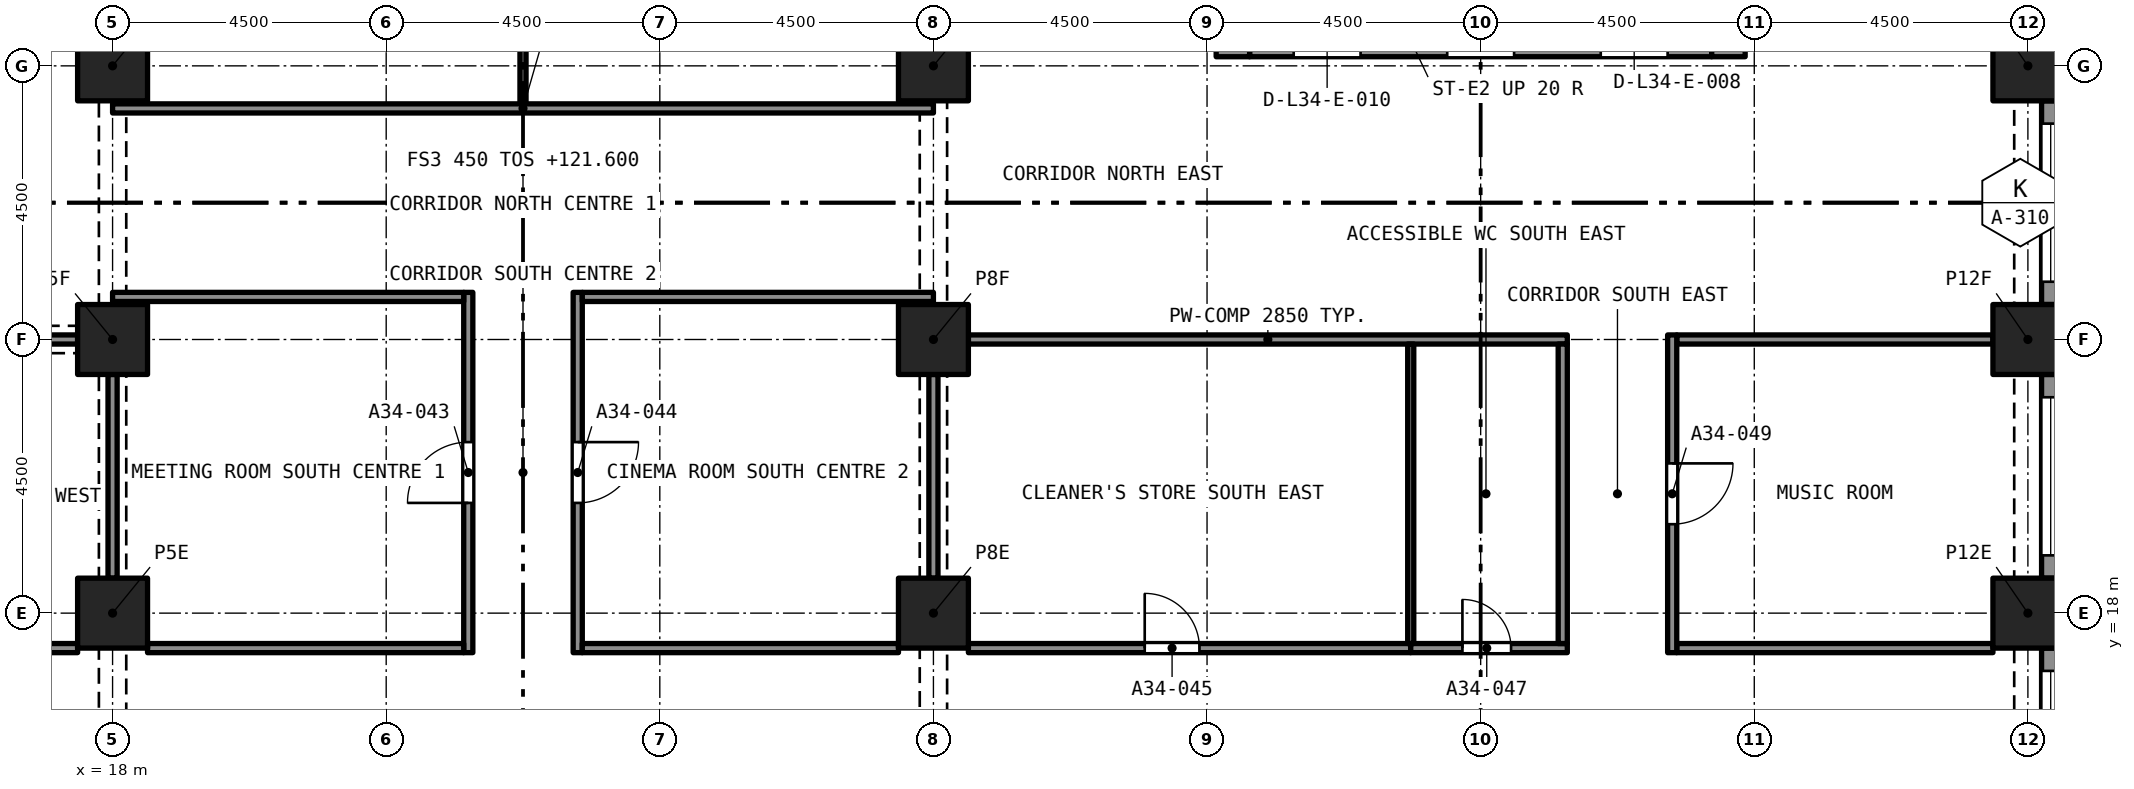
"""IFC4 building model, lengths in metres.
Left out: names, types, materials, properties, quantities, classifications, styles, units other than length and angle.
Written with IfcOpenShell. Run it as: python <this file> out.ifc"""

import sys

from ifc_helpers import new_model, si_unit, direction, frame, frame_2d, origin, origin_2d, place, context, subcontext, project, spatial, rectangle, extrude, element, fill, save


model = new_model("IFC4")
c1 = context("Model", 3, precision=1e-05, world=origin(), true_north=direction((0.0, 1.0)))
c2 = subcontext(c1, "Body", "Model", "MODEL_VIEW")
j1 = project(units=[si_unit("LENGTHUNIT", "METRE"), si_unit("PLANEANGLEUNIT", "RADIAN")], contexts=[c1])
p1 = place(None, origin())
s1 = spatial("IfcSite", under=j1, at=p1, CompositionType="ELEMENT")
p2 = place(p1, origin())
s2 = spatial("IfcBuilding", under=s1, at=p2, CompositionType="ELEMENT")
p3 = place(p2, frame((0.0, 0.0, 121.6)))
s3 = spatial("IfcBuildingStorey", under=s2, at=p3, CompositionType="ELEMENT", Elevation=121.6)
for number, where, z_axis, x_axis in (
    (1, (18.0, 18.0, 0.0), (0.0, 0.0, 1.0), (1.0, 0.0, 0.0)),
    (2, (31.5, 18.0, 0.0), (0.0, 0.0, 1.0), (1.0, 0.0, 0.0)),
    (3, (49.5, 18.0, 0.0), (0.0, 0.0, 1.0), (1.0, 0.0, 0.0)),
    (4, (18.0, 22.5, 0.0), (0.0, 0.0, 1.0), (1.0, 0.0, 0.0)),
    (5, (31.5, 22.5, 0.0), (0.0, 0.0, 1.0), (1.0, 0.0, 0.0)),
    (6, (49.5, 22.5, 0.0), (0.0, 0.0, 1.0), (1.0, 0.0, 0.0)),
    (7, (18.0, 27.0, 0.0), (0.0, 0.0, 1.0), (1.0, 0.0, 0.0)),
    (8, (31.5, 27.0, 0.0), (0.0, 0.0, 1.0), (1.0, 0.0, 0.0)),
    (9, (49.5, 27.0, 0.0), (0.0, 0.0, 1.0), (1.0, 0.0, 0.0)),
):
    element("IfcColumn", number, at=place(p3, frame(where, z_axis=z_axis, x_axis=x_axis)), inside=s3, PredefinedType="COLUMN", context=c2, shape_type="SweptSolid", body=[
        extrude(rectangle(XDim=1.15, YDim=1.15, at=origin_2d()), origin(), (0.0, 0.0, 1.0), 3.2),
    ])
p4 = place(p3, frame((36.7, 27.425, 0.0), z_axis=(0.0, 0.0, 1.0), x_axis=(1.0, 0.0, 0.0)))
e10 = element("IfcWall", 10, at=p4, inside=s3, PredefinedType="SOLIDWALL", context=c2, shape_type="SweptSolid", body=[
    extrude(rectangle(XDim=7.6, YDim=0.55, at=frame_2d((3.8, 0.0))), origin(), (0.0, 0.0, 1.0), 3.2),
])
p5 = place(p4, frame((5.775, 0.0, 0.0)))
e11 = element("IfcOpeningElement", 11, at=p5, cuts=e10, PredefinedType="OPENING", context=c2, shape_type="SweptSolid", body=[
    extrude(rectangle(XDim=1.1, YDim=2.1, at=frame_2d((0.55, 1.05))), frame((0.0, 0.285, 0.0), z_axis=(0.0, -1.0, 0.0), x_axis=(1.0, 0.0, 0.0)), (0.0, 0.0, 1.0), 0.57),
])
p6 = place(p4, frame((3.25, 0.0, 0.0)))
e12 = element("IfcOpeningElement", 12, at=p6, cuts=e10, PredefinedType="OPENING", context=c2, shape_type="SweptSolid", body=[
    extrude(rectangle(XDim=1.1, YDim=2.1, at=frame_2d((0.55, 1.05))), frame((0.0, 0.285, 0.0), z_axis=(0.0, -1.0, 0.0), x_axis=(1.0, 0.0, 0.0)), (0.0, 0.0, 1.0), 0.57),
])
p7 = place(p4, frame((0.725, 0.0, 0.0)))
e13 = element("IfcOpeningElement", 13, at=p7, cuts=e10, PredefinedType="OPENING", context=c2, shape_type="SweptSolid", body=[
    extrude(rectangle(XDim=1.1, YDim=2.1, at=frame_2d((0.55, 1.05))), frame((0.0, 0.285, 0.0), z_axis=(0.0, -1.0, 0.0), x_axis=(1.0, 0.0, 0.0)), (0.0, 0.0, 1.0), 0.57),
])
p8 = place(p3, frame((36.425, 27.15, 0.0), z_axis=(0.0, 0.0, 1.0), x_axis=(0.0, 1.0, 0.0)))
e14 = element("IfcWall", 14, at=p8, inside=s3, PredefinedType="SOLIDWALL", context=c2, shape_type="SweptSolid", body=[
    extrude(rectangle(XDim=13.2, YDim=0.55, at=frame_2d((6.6, 0.0))), origin(), (0.0, 0.0, 1.0), 3.2),
])
p9 = place(p8, frame((8.8, 0.0, 0.0)))
e15 = element("IfcOpeningElement", 15, at=p9, cuts=e14, PredefinedType="OPENING", context=c2, shape_type="SweptSolid", body=[
    extrude(rectangle(XDim=1.2, YDim=2.1, at=frame_2d((0.6, 1.05))), frame((0.0, 0.285, 0.0), z_axis=(0.0, -1.0, 0.0), x_axis=(1.0, 0.0, 0.0)), (0.0, 0.0, 1.0), 0.57),
])
p10 = place(p3, frame((44.575, 27.15, 0.0), z_axis=(0.0, 0.0, 1.0), x_axis=(0.0, 1.0, 0.0)))
e16 = element("IfcWall", 16, at=p10, inside=s3, PredefinedType="SOLIDWALL", context=c2, shape_type="SweptSolid", body=[
    extrude(rectangle(XDim=13.2, YDim=0.55, at=frame_2d((6.6, 0.0))), origin(), (0.0, 0.0, 1.0), 3.2),
])
p11 = place(p10, frame((8.8, 0.0, 0.0)))
e17 = element("IfcOpeningElement", 17, at=p11, cuts=e16, PredefinedType="OPENING", context=c2, shape_type="SweptSolid", body=[
    extrude(rectangle(XDim=1.2, YDim=2.1, at=frame_2d((0.6, 1.05))), frame((0.0, 0.285, 0.0), z_axis=(0.0, -1.0, 0.0), x_axis=(1.0, 0.0, 0.0)), (0.0, 0.0, 1.0), 0.57),
])
p12 = place(p3, frame((49.875, 17.425, 0.0), z_axis=(0.0, 0.0, 1.0), x_axis=(0.0, -1.0, 0.0)))
e18 = element("IfcWall", 18, at=p12, inside=s3, PredefinedType="SOLIDWALL", context=c2, shape_type="SweptSolid", body=[
    extrude(rectangle(XDim=3.35, YDim=0.3, at=frame_2d((1.675, 0.0))), origin(), (0.0, 0.0, 1.0), 3.2),
])
p13 = place(p12, frame((0.375, 0.0, 0.45)))
e19 = element("IfcOpeningElement", 19, at=p13, cuts=e18, PredefinedType="OPENING", context=c2, shape_type="SweptSolid", body=[
    extrude(rectangle(XDim=2.6, YDim=1.95, at=frame_2d((1.3, 0.975))), frame((0.0, 0.16, 0.0), z_axis=(0.0, -1.0, 0.0), x_axis=(1.0, 0.0, 0.0)), (0.0, 0.0, 1.0), 0.32),
])
p14 = place(p3, frame((49.875, 21.925, 0.0), z_axis=(0.0, 0.0, 1.0), x_axis=(0.0, -1.0, 0.0)))
e20 = element("IfcWall", 20, at=p14, inside=s3, PredefinedType="SOLIDWALL", context=c2, shape_type="SweptSolid", body=[
    extrude(rectangle(XDim=3.35, YDim=0.3, at=frame_2d((1.675, 0.0))), origin(), (0.0, 0.0, 1.0), 3.2),
])
p15 = place(p14, frame((0.375, 0.0, 0.45)))
e21 = element("IfcOpeningElement", 21, at=p15, cuts=e20, PredefinedType="OPENING", context=c2, shape_type="SweptSolid", body=[
    extrude(rectangle(XDim=2.6, YDim=1.95, at=frame_2d((1.3, 0.975))), frame((0.0, 0.16, 0.0), z_axis=(0.0, -1.0, 0.0), x_axis=(1.0, 0.0, 0.0)), (0.0, 0.0, 1.0), 0.32),
])
p16 = place(p3, frame((49.875, 26.425, 0.0), z_axis=(0.0, 0.0, 1.0), x_axis=(0.0, -1.0, 0.0)))
e22 = element("IfcWall", 22, at=p16, inside=s3, PredefinedType="SOLIDWALL", context=c2, shape_type="SweptSolid", body=[
    extrude(rectangle(XDim=3.35, YDim=0.3, at=frame_2d((1.675, 0.0))), origin(), (0.0, 0.0, 1.0), 3.2),
])
p17 = place(p16, frame((0.375, 0.0, 0.45)))
e23 = element("IfcOpeningElement", 23, at=p17, cuts=e22, PredefinedType="OPENING", context=c2, shape_type="SweptSolid", body=[
    extrude(rectangle(XDim=2.6, YDim=1.95, at=frame_2d((1.3, 0.975))), frame((0.0, 0.16, 0.0), z_axis=(0.0, -1.0, 0.0), x_axis=(1.0, 0.0, 0.0)), (0.0, 0.0, 1.0), 0.32),
])
p18 = place(p3, frame((23.85, 17.35, 0.0), z_axis=(0.0, 0.0, 1.0), x_axis=(0.0, 1.0, 0.0)))
e24 = element("IfcWall", 24, at=p18, inside=s3, PredefinedType="PARTITIONING", context=c2, shape_type="SweptSolid", body=[
    extrude(rectangle(XDim=5.925, YDim=0.15, at=frame_2d((2.962, 0.0))), origin(), (0.0, 0.0, 1.0), 2.75),
])
p19 = place(p18, frame((2.462, 0.0, 0.0)))
e25 = element("IfcOpeningElement", 25, at=p19, cuts=e24, PredefinedType="OPENING", context=c2, shape_type="SweptSolid", body=[
    extrude(rectangle(XDim=1.0, YDim=2.1, at=frame_2d((0.5, 1.05))), frame((0.0, 0.085, 0.0), z_axis=(0.0, -1.0, 0.0), x_axis=(1.0, 0.0, 0.0)), (0.0, 0.0, 1.0), 0.17),
])
p20 = place(p3, frame((25.65, 23.275, 0.0), z_axis=(0.0, 0.0, 1.0), x_axis=(0.0, -1.0, 0.0)))
e26 = element("IfcWall", 26, at=p20, inside=s3, PredefinedType="PARTITIONING", context=c2, shape_type="SweptSolid", body=[
    extrude(rectangle(XDim=5.925, YDim=0.15, at=frame_2d((2.962, 0.0))), origin(), (0.0, 0.0, 1.0), 2.75),
])
p21 = place(p20, frame((2.462, 0.0, 0.0)))
e27 = element("IfcOpeningElement", 27, at=p21, cuts=e26, PredefinedType="OPENING", context=c2, shape_type="SweptSolid", body=[
    extrude(rectangle(XDim=1.0, YDim=2.1, at=frame_2d((0.5, 1.05))), frame((0.0, 0.085, 0.0), z_axis=(0.0, -1.0, 0.0), x_axis=(1.0, 0.0, 0.0)), (0.0, 0.0, 1.0), 0.17),
])
for number, where, z_axis, x_axis in (
    (28, (18.575, 17.425, 0.0), (0.0, 0.0, 1.0), (1.0, 0.0, 0.0)),
    (29, (25.725, 17.425, 0.0), (0.0, 0.0, 1.0), (1.0, 0.0, 0.0)),
):
    element("IfcWall", number, at=place(p3, frame(where, z_axis=z_axis, x_axis=x_axis)), inside=s3, PredefinedType="PARTITIONING", context=c2, shape_type="SweptSolid", body=[
        extrude(rectangle(XDim=5.2, YDim=0.15, at=frame_2d((2.6, 0.0))), origin(), (0.0, 0.0, 1.0), 2.75),
    ])
p22 = place(p3, frame((32.075, 17.425, 0.0), z_axis=(0.0, 0.0, 1.0), x_axis=(1.0, 0.0, 0.0)))
e30 = element("IfcWall", 30, at=p22, inside=s3, PredefinedType="PARTITIONING", context=c2, shape_type="SweptSolid", body=[
    extrude(rectangle(XDim=7.275, YDim=0.15, at=frame_2d((3.638, 0.0))), origin(), (0.0, 0.0, 1.0), 2.85),
])
p23 = place(p22, frame((2.9, 0.0, 0.0)))
e31 = element("IfcOpeningElement", 31, at=p23, cuts=e30, PredefinedType="OPENING", context=c2, shape_type="SweptSolid", body=[
    extrude(rectangle(XDim=0.9, YDim=2.1, at=frame_2d((0.45, 1.05))), frame((0.0, 0.085, 0.0), z_axis=(0.0, -1.0, 0.0), x_axis=(1.0, 0.0, 0.0)), (0.0, 0.0, 1.0), 0.17),
])
p24 = place(p3, frame((10.15, 17.425, 0.0), z_axis=(0.0, 0.0, 1.0), x_axis=(1.0, 0.0, 0.0)))
e32 = element("IfcWall", 32, at=p24, inside=s3, PredefinedType="PARTITIONING", context=c2, shape_type="SweptSolid", body=[
    extrude(rectangle(XDim=7.275, YDim=0.15, at=frame_2d((3.638, 0.0))), origin(), (0.0, 0.0, 1.0), 2.85),
])
p25 = place(p24, frame((3.475, 0.0, 0.0)))
e33 = element("IfcOpeningElement", 33, at=p25, cuts=e32, PredefinedType="OPENING", context=c2, shape_type="SweptSolid", body=[
    extrude(rectangle(XDim=0.9, YDim=2.1, at=frame_2d((0.45, 1.05))), frame((0.0, 0.085, 0.0), z_axis=(0.0, -1.0, 0.0), x_axis=(1.0, 0.0, 0.0)), (0.0, 0.0, 1.0), 0.17),
])
p26 = place(p3, frame((39.35, 17.425, 0.0), z_axis=(0.0, 0.0, 1.0), x_axis=(1.0, 0.0, 0.0)))
e34 = element("IfcWall", 34, at=p26, inside=s3, PredefinedType="PARTITIONING", context=c2, shape_type="SweptSolid", body=[
    extrude(rectangle(XDim=2.575, YDim=0.15, at=frame_2d((1.288, 0.0))), origin(), (0.0, 0.0, 1.0), 2.85),
])
p27 = place(p26, frame((0.85, 0.0, 0.0)))
e35 = element("IfcOpeningElement", 35, at=p27, cuts=e34, PredefinedType="OPENING", context=c2, shape_type="SweptSolid", body=[
    extrude(rectangle(XDim=0.8, YDim=2.1, at=frame_2d((0.4, 1.05))), frame((0.0, 0.085, 0.0), z_axis=(0.0, -1.0, 0.0), x_axis=(1.0, 0.0, 0.0)), (0.0, 0.0, 1.0), 0.17),
])
p28 = place(p3, frame((43.725, 17.425, 0.0), z_axis=(0.0, 0.0, 1.0), x_axis=(1.0, 0.0, 0.0)))
e36 = element("IfcWall", 36, at=p28, inside=s3, PredefinedType="PARTITIONING", context=c2, shape_type="SweptSolid", body=[
    extrude(rectangle(XDim=5.2, YDim=0.15, at=frame_2d((2.6, 0.0))), origin(), (0.0, 0.0, 1.0), 2.85),
])
p29 = place(p3, frame((24.75, 26.375, 0.0), z_axis=(0.0, 0.0, 1.0), x_axis=(0.0, 1.0, 0.0)))
e37 = element("IfcWall", 37, at=p29, inside=s3, PredefinedType="PARTITIONING", context=c2, shape_type="SweptSolid", body=[
    extrude(rectangle(XDim=10.125, YDim=0.1, at=frame_2d((5.062, 0.0))), origin(), (0.0, 0.0, 1.0), 2.75),
])
p30 = place(p3, frame((18.0, 26.3, 0.0), z_axis=(0.0, 0.0, 1.0), x_axis=(1.0, 0.0, 0.0)))
e38 = element("IfcWall", 38, at=p30, inside=s3, PredefinedType="PARTITIONING", context=c2, shape_type="SweptSolid", body=[
    extrude(rectangle(XDim=13.5, YDim=0.15, at=frame_2d((6.75, 0.0))), origin(), (0.0, 0.0, 1.0), 2.38),
])
p31 = place(p3, frame((18.0, 23.2, 0.0), z_axis=(0.0, 0.0, 1.0), x_axis=(1.0, 0.0, 0.0)))
e39 = element("IfcWall", 39, at=p31, inside=s3, PredefinedType="PARTITIONING", context=c2, shape_type="SweptSolid", body=[
    extrude(rectangle(XDim=5.775, YDim=0.15, at=frame_2d((2.887, 0.0))), origin(), (0.0, 0.0, 1.0), 2.75),
])
p32 = place(p3, frame((18.0, 18.575, 0.0), z_axis=(0.0, 0.0, 1.0), x_axis=(0.0, 1.0, 0.0)))
e40 = element("IfcWall", 40, at=p32, inside=s3, PredefinedType="PARTITIONING", context=c2, shape_type="SweptSolid", body=[
    extrude(rectangle(XDim=3.35, YDim=0.15, at=frame_2d((1.675, 0.0))), origin(), (0.0, 0.0, 1.0), 2.38),
])
p33 = place(p3, frame((25.725, 23.2, 0.0), z_axis=(0.0, 0.0, 1.0), x_axis=(1.0, 0.0, 0.0)))
e41 = element("IfcWall", 41, at=p33, inside=s3, PredefinedType="PARTITIONING", context=c2, shape_type="SweptSolid", body=[
    extrude(rectangle(XDim=5.775, YDim=0.15, at=frame_2d((2.887, 0.0))), origin(), (0.0, 0.0, 1.0), 2.75),
])
p34 = place(p3, frame((31.5, 18.575, 0.0), z_axis=(0.0, 0.0, 1.0), x_axis=(0.0, 1.0, 0.0)))
e42 = element("IfcWall", 42, at=p34, inside=s3, PredefinedType="PARTITIONING", context=c2, shape_type="SweptSolid", body=[
    extrude(rectangle(XDim=3.35, YDim=0.15, at=frame_2d((1.675, 0.0))), origin(), (0.0, 0.0, 1.0), 2.38),
])
p35 = place(p3, frame((32.075, 22.5, 0.0), z_axis=(0.0, 0.0, 1.0), x_axis=(1.0, 0.0, 0.0)))
e43 = element("IfcWall", 43, at=p35, inside=s3, PredefinedType="PARTITIONING", context=c2, shape_type="SweptSolid", body=[
    extrude(rectangle(XDim=9.85, YDim=0.15, at=frame_2d((4.925, 0.0))), origin(), (0.0, 0.0, 1.0), 2.85),
])
p36 = place(p3, frame((43.725, 22.5, 0.0), z_axis=(0.0, 0.0, 1.0), x_axis=(1.0, 0.0, 0.0)))
e44 = element("IfcWall", 44, at=p36, inside=s3, PredefinedType="PARTITIONING", context=c2, shape_type="SweptSolid", body=[
    extrude(rectangle(XDim=5.2, YDim=0.15, at=frame_2d((2.6, 0.0))), origin(), (0.0, 0.0, 1.0), 2.85),
])
p37 = place(p3, frame((14.075, 22.5, 0.0), z_axis=(0.0, 0.0, 1.0), x_axis=(1.0, 0.0, 0.0)))
e45 = element("IfcWall", 45, at=p37, inside=s3, PredefinedType="PARTITIONING", context=c2, shape_type="SweptSolid", body=[
    extrude(rectangle(XDim=3.35, YDim=0.15, at=frame_2d((1.675, 0.0))), origin(), (0.0, 0.0, 1.0), 2.38),
])
p38 = place(p3, frame((41.85, 17.5, 0.0), z_axis=(0.0, 0.0, 1.0), x_axis=(0.0, 1.0, 0.0)))
e46 = element("IfcWall", 46, at=p38, inside=s3, PredefinedType="PARTITIONING", context=c2, shape_type="SweptSolid", body=[
    extrude(rectangle(XDim=4.925, YDim=0.15, at=frame_2d((2.462, 0.0))), origin(), (0.0, 0.0, 1.0), 2.85),
])
p39 = place(p3, frame((43.65, 22.575, 0.0), z_axis=(0.0, 0.0, 1.0), x_axis=(0.0, -1.0, 0.0)))
e47 = element("IfcWall", 47, at=p39, inside=s3, PredefinedType="PARTITIONING", context=c2, shape_type="SweptSolid", body=[
    extrude(rectangle(XDim=5.225, YDim=0.15, at=frame_2d((2.612, 0.0))), origin(), (0.0, 0.0, 1.0), 2.85),
])
p40 = place(p39, frame((2.113, 0.0, 0.0)))
e48 = element("IfcOpeningElement", 48, at=p40, cuts=e47, PredefinedType="OPENING", context=c2, shape_type="SweptSolid", body=[
    extrude(rectangle(XDim=1.0, YDim=2.1, at=frame_2d((0.5, 1.05))), frame((0.0, 0.085, 0.0), z_axis=(0.0, -1.0, 0.0), x_axis=(1.0, 0.0, 0.0)), (0.0, 0.0, 1.0), 0.17),
])
p41 = place(p3, frame((39.35, 17.5, 0.0), z_axis=(0.0, 0.0, 1.0), x_axis=(0.0, 1.0, 0.0)))
e49 = element("IfcWall", 49, at=p41, inside=s3, PredefinedType="PARTITIONING", context=c2, shape_type="SweptSolid", body=[
    extrude(rectangle(XDim=4.925, YDim=0.1, at=frame_2d((2.462, 0.0))), origin(), (0.0, 0.0, 1.0), 2.85),
])
p42 = place(p13, origin())
e50 = element("IfcWindow", 50, at=p42, inside=s3, PartitioningType="SINGLE_PANEL", PredefinedType="WINDOW", context=c2, shape_type="SweptSolid", body=[
    extrude(rectangle(XDim=2.6, YDim=1.95, at=frame_2d((1.3, 0.975))), frame((0.0, 0.03, 0.0), z_axis=(0.0, -1.0, 0.0), x_axis=(1.0, 0.0, 0.0)), (0.0, 0.0, 1.0), 0.06),
])
fill(e19, e50)
p43 = place(p15, origin())
e51 = element("IfcWindow", 51, at=p43, inside=s3, PartitioningType="SINGLE_PANEL", PredefinedType="WINDOW", context=c2, shape_type="SweptSolid", body=[
    extrude(rectangle(XDim=2.6, YDim=1.95, at=frame_2d((1.3, 0.975))), frame((0.0, 0.03, 0.0), z_axis=(0.0, -1.0, 0.0), x_axis=(1.0, 0.0, 0.0)), (0.0, 0.0, 1.0), 0.06),
])
fill(e21, e51)
p44 = place(p17, origin())
e52 = element("IfcWindow", 52, at=p44, inside=s3, PartitioningType="SINGLE_PANEL", PredefinedType="WINDOW", context=c2, shape_type="SweptSolid", body=[
    extrude(rectangle(XDim=2.6, YDim=1.95, at=frame_2d((1.3, 0.975))), frame((0.0, 0.03, 0.0), z_axis=(0.0, -1.0, 0.0), x_axis=(1.0, 0.0, 0.0)), (0.0, 0.0, 1.0), 0.06),
])
fill(e23, e52)
p45 = place(p19, origin())
e53 = element("IfcDoor", 53, at=p45, inside=s3, OperationType="SINGLE_SWING_RIGHT", PredefinedType="DOOR", context=c2, shape_type="SweptSolid", body=[
    extrude(rectangle(XDim=1.0, YDim=2.1, at=frame_2d((0.5, 1.05))), frame((0.0, 0.025, 0.0), z_axis=(0.0, -1.0, 0.0), x_axis=(1.0, 0.0, 0.0)), (0.0, 0.0, 1.0), 0.05),
])
fill(e25, e53)
p46 = place(p21, origin())
e54 = element("IfcDoor", 54, at=p46, inside=s3, OperationType="SINGLE_SWING_RIGHT", PredefinedType="DOOR", context=c2, shape_type="SweptSolid", body=[
    extrude(rectangle(XDim=1.0, YDim=2.1, at=frame_2d((0.5, 1.05))), frame((0.0, 0.025, 0.0), z_axis=(0.0, -1.0, 0.0), x_axis=(1.0, 0.0, 0.0)), (0.0, 0.0, 1.0), 0.05),
])
fill(e27, e54)
p47 = place(p23, origin())
e55 = element("IfcDoor", 55, at=p47, inside=s3, OperationType="SINGLE_SWING_LEFT", PredefinedType="DOOR", context=c2, shape_type="SweptSolid", body=[
    extrude(rectangle(XDim=0.9, YDim=2.1, at=frame_2d((0.45, 1.05))), frame((0.0, 0.025, 0.0), z_axis=(0.0, -1.0, 0.0), x_axis=(1.0, 0.0, 0.0)), (0.0, 0.0, 1.0), 0.05),
])
fill(e31, e55)
p48 = place(p27, origin())
e56 = element("IfcDoor", 56, at=p48, inside=s3, OperationType="SINGLE_SWING_LEFT", PredefinedType="DOOR", context=c2, shape_type="SweptSolid", body=[
    extrude(rectangle(XDim=0.8, YDim=2.1, at=frame_2d((0.4, 1.05))), frame((0.0, 0.025, 0.0), z_axis=(0.0, -1.0, 0.0), x_axis=(1.0, 0.0, 0.0)), (0.0, 0.0, 1.0), 0.05),
])
fill(e35, e56)
p49 = place(p40, origin())
e57 = element("IfcDoor", 57, at=p49, inside=s3, OperationType="SINGLE_SWING_RIGHT", PredefinedType="DOOR", context=c2, shape_type="SweptSolid", body=[
    extrude(rectangle(XDim=1.0, YDim=2.1, at=frame_2d((0.5, 1.05))), frame((0.0, 0.025, 0.0), z_axis=(0.0, -1.0, 0.0), x_axis=(1.0, 0.0, 0.0)), (0.0, 0.0, 1.0), 0.05),
])
fill(e48, e57)
save(model, sys.argv[1])
